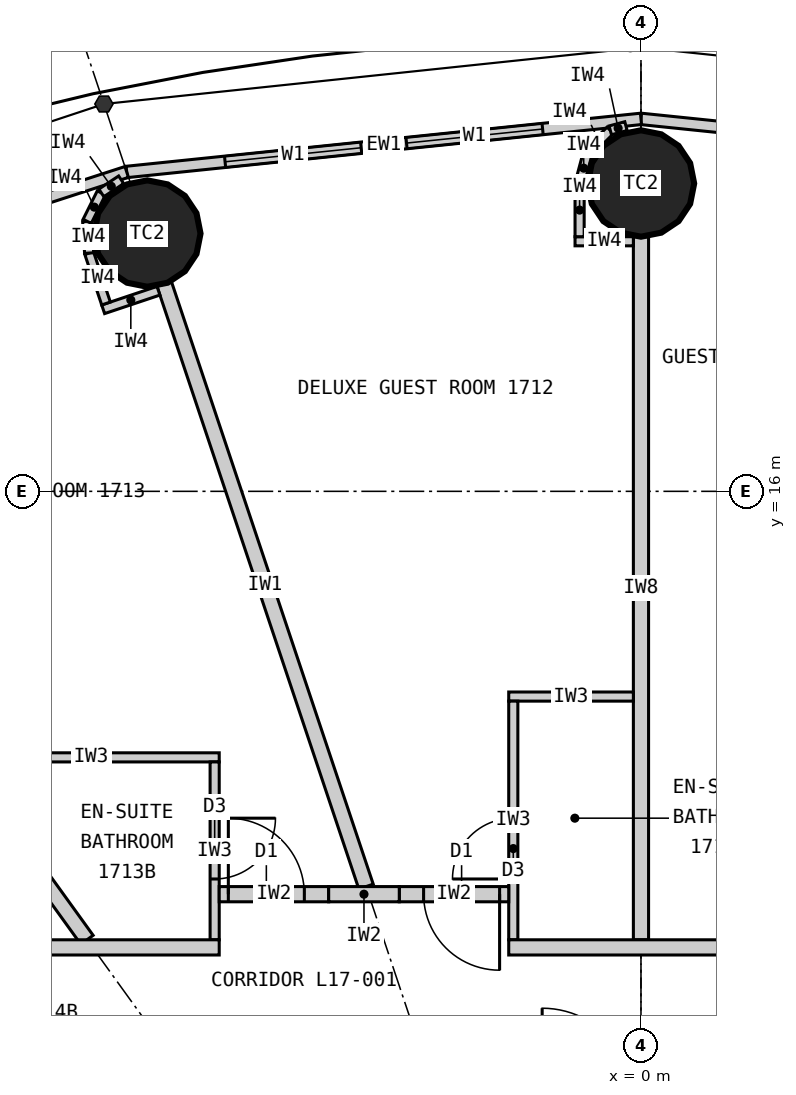
"""IFC4 building model, lengths in metres.
Left out: names, types, materials, properties, quantities, classifications, styles, units other than length and angle.
Written with IfcOpenShell. Run it as: python <this file> out.ifc"""

import sys

from ifc_helpers import new_model, si_unit, direction, frame, frame_2d, origin, origin_2d, place, context, subcontext, project, spatial, rectangle, circle, extrude, element, fill, save


model = new_model("IFC4")
c1 = context("Model", 3, precision=1e-05, world=origin(), true_north=direction((0.0, 1.0)))
c2 = subcontext(c1, "Body", "Model", "MODEL_VIEW")
j1 = project(units=[si_unit("LENGTHUNIT", "METRE"), si_unit("PLANEANGLEUNIT", "RADIAN")], contexts=[c1])
p1 = place(None, origin())
s1 = spatial("IfcSite", under=j1, at=p1, CompositionType="ELEMENT")
p2 = place(p1, origin())
s2 = spatial("IfcBuilding", under=s1, at=p2, CompositionType="ELEMENT")
p3 = place(p2, frame((0.0, 0.0, 70.5)))
s3 = spatial("IfcBuildingStorey", under=s2, at=p3, CompositionType="ELEMENT", Elevation=70.5)
for number, where, z_axis, x_axis in (
    (1, (0.0, 20.05, 0.0), (0.0, 0.0, 1.0), (1.0, 0.0, 0.0)),
    (2, (-6.495, 19.391, 0.0), (0.0, 0.0, 1.0), (1.0, 0.0, 0.0)),
):
    element("IfcColumn", number, at=place(p3, frame(where, z_axis=z_axis, x_axis=x_axis)), inside=s3, PredefinedType="COLUMN", context=c2, shape_type="SweptSolid", body=[
        extrude(circle(Radius=0.7, at=origin_2d()), origin(), (0.0, 0.0, 1.0), 3.3),
    ])
p4 = place(p3, frame((6.766, 20.202, 0.0), z_axis=(0.0, 0.0, 1.0), x_axis=(-0.994721394369, 0.102612609291, 0.0)))
e3 = element("IfcWall", 3, at=p4, inside=s3, PredefinedType="ELEMENTEDWALL", context=c2, shape_type="SweptSolid", body=[
    extrude(rectangle(XDim=6.802, YDim=0.15, at=frame_2d((3.401, 0.0))), origin(), (0.0, 0.0, 1.0), 3.12),
])
p5 = place(p4, frame((1.301, 0.0, 0.9)))
e4 = element("IfcOpeningElement", 4, at=p5, cuts=e3, PredefinedType="OPENING", context=c2, shape_type="SweptSolid", body=[
    extrude(rectangle(XDim=1.8, YDim=1.9, at=frame_2d((0.9, 0.95))), frame((0.0, 0.085, 0.0), z_axis=(0.0, -1.0, 0.0), x_axis=(1.0, 0.0, 0.0)), (0.0, 0.0, 1.0), 0.17),
])
p6 = place(p4, frame((3.701, 0.0, 0.9)))
e5 = element("IfcOpeningElement", 5, at=p6, cuts=e3, PredefinedType="OPENING", context=c2, shape_type="SweptSolid", body=[
    extrude(rectangle(XDim=1.8, YDim=1.9, at=frame_2d((0.9, 0.95))), frame((0.0, 0.085, 0.0), z_axis=(0.0, -1.0, 0.0), x_axis=(1.0, 0.0, 0.0)), (0.0, 0.0, 1.0), 0.17),
])
p7 = place(p3, frame((0.0, 20.9, 0.0), z_axis=(0.0, 0.0, 1.0), x_axis=(-0.994721394369, -0.102612609291, 0.0)))
e6 = element("IfcWall", 6, at=p7, inside=s3, PredefinedType="ELEMENTEDWALL", context=c2, shape_type="SweptSolid", body=[
    extrude(rectangle(XDim=6.802, YDim=0.15, at=frame_2d((3.401, 0.0))), origin(), (0.0, 0.0, 1.0), 3.12),
])
p8 = place(p7, frame((1.301, 0.0, 0.9)))
e7 = element("IfcOpeningElement", 7, at=p8, cuts=e6, PredefinedType="OPENING", context=c2, shape_type="SweptSolid", body=[
    extrude(rectangle(XDim=1.8, YDim=1.9, at=frame_2d((0.9, 0.95))), frame((0.0, 0.085, 0.0), z_axis=(0.0, -1.0, 0.0), x_axis=(1.0, 0.0, 0.0)), (0.0, 0.0, 1.0), 0.17),
])
p9 = place(p7, frame((3.701, 0.0, 0.9)))
e8 = element("IfcOpeningElement", 8, at=p9, cuts=e6, PredefinedType="OPENING", context=c2, shape_type="SweptSolid", body=[
    extrude(rectangle(XDim=1.8, YDim=1.9, at=frame_2d((0.9, 0.95))), frame((0.0, 0.085, 0.0), z_axis=(0.0, -1.0, 0.0), x_axis=(1.0, 0.0, 0.0)), (0.0, 0.0, 1.0), 0.17),
])
p10 = place(p3, frame((-6.766, 20.202, 0.0), z_axis=(0.0, 0.0, 1.0), x_axis=(-0.951137534625, -0.308767534285, 0.0)))
e9 = element("IfcWall", 9, at=p10, inside=s3, PredefinedType="ELEMENTEDWALL", context=c2, shape_type="SweptSolid", body=[
    extrude(rectangle(XDim=6.655, YDim=0.15, at=frame_2d((3.328, 0.0))), origin(), (0.0, 0.0, 1.0), 3.12),
])
p11 = place(p10, frame((1.228, 0.0, 0.9)))
e10 = element("IfcOpeningElement", 10, at=p11, cuts=e9, PredefinedType="OPENING", context=c2, shape_type="SweptSolid", body=[
    extrude(rectangle(XDim=1.8, YDim=1.9, at=frame_2d((0.9, 0.95))), frame((0.0, 0.085, 0.0), z_axis=(0.0, -1.0, 0.0), x_axis=(1.0, 0.0, 0.0)), (0.0, 0.0, 1.0), 0.17),
])
p12 = place(p10, frame((3.628, 0.0, 0.9)))
e11 = element("IfcOpeningElement", 11, at=p12, cuts=e9, PredefinedType="OPENING", context=c2, shape_type="SweptSolid", body=[
    extrude(rectangle(XDim=1.8, YDim=1.9, at=frame_2d((0.9, 0.95))), frame((0.0, 0.085, 0.0), z_axis=(0.0, -1.0, 0.0), x_axis=(1.0, 0.0, 0.0)), (0.0, 0.0, 1.0), 0.17),
])
p13 = place(p3, frame((0.0, 10.1, 0.0), z_axis=(0.0, 0.0, 1.0), x_axis=(0.0, 1.0, 0.0)))
e12 = element("IfcWall", 12, at=p13, inside=s3, PredefinedType="PARTITIONING", context=c2, shape_type="SweptSolid", body=[
    extrude(rectangle(XDim=9.25, YDim=0.2, at=frame_2d((4.625, 0.0))), origin(), (0.0, 0.0, 1.0), 2.32),
])
p14 = place(p3, frame((-3.617, 10.8, 0.0), z_axis=(0.0, 0.0, 1.0), x_axis=(-0.317576599239, 0.948232621046, 0.0)))
e13 = element("IfcWall", 13, at=p14, inside=s3, PredefinedType="PARTITIONING", context=c2, shape_type="SweptSolid", body=[
    extrude(rectangle(XDim=8.36, YDim=0.2, at=frame_2d((4.18, 0.0))), origin(), (0.0, 0.0, 1.0), 2.32),
])
p15 = place(p3, frame((-7.289, 10.1, 0.0), z_axis=(0.0, 0.0, 1.0), x_axis=(-0.585198353053, 0.810890182197, 0.0)))
e14 = element("IfcWall", 14, at=p15, inside=s3, PredefinedType="PARTITIONING", context=c2, shape_type="SweptSolid", body=[
    extrude(rectangle(XDim=8.36, YDim=0.2, at=frame_2d((4.18, 0.0))), origin(), (0.0, 0.0, 1.0), 2.32),
])
p16 = place(p3, frame((-0.1, 13.3, 0.0), z_axis=(0.0, 0.0, 1.0), x_axis=(-1.0, 0.0, 0.0)))
e15 = element("IfcWall", 15, at=p16, inside=s3, PredefinedType="PARTITIONING", context=c2, shape_type="SweptSolid", body=[
    extrude(rectangle(XDim=1.64, YDim=0.12, at=frame_2d((0.82, 0.0))), origin(), (0.0, 0.0, 1.0), 3.12),
])
p17 = place(p3, frame((-1.68, 10.1, 0.0), z_axis=(0.0, 0.0, 1.0), x_axis=(0.0, 1.0, 0.0)))
e16 = element("IfcWall", 16, at=p17, inside=s3, PredefinedType="PARTITIONING", context=c2, shape_type="SweptSolid", body=[
    extrude(rectangle(XDim=3.14, YDim=0.12, at=frame_2d((1.57, 0.0))), origin(), (0.0, 0.0, 1.0), 3.12),
])
p18 = place(p17, frame((0.8, 0.0, 0.0)))
e17 = element("IfcOpeningElement", 17, at=p18, cuts=e16, PredefinedType="OPENING", context=c2, shape_type="SweptSolid", body=[
    extrude(rectangle(XDim=0.8, YDim=2.1, at=frame_2d((0.4, 1.05))), frame((0.0, 0.07, 0.0), z_axis=(0.0, -1.0, 0.0), x_axis=(1.0, 0.0, 0.0)), (0.0, 0.0, 1.0), 0.14),
])
p19 = place(p3, frame((-8.921, 12.5, 0.0), z_axis=(0.0, 0.0, 1.0), x_axis=(1.0, 0.0, 0.0)))
e18 = element("IfcWall", 18, at=p19, inside=s3, PredefinedType="PARTITIONING", context=c2, shape_type="SweptSolid", body=[
    extrude(rectangle(XDim=3.372, YDim=0.12, at=frame_2d((1.686, 0.0))), origin(), (0.0, 0.0, 1.0), 3.12),
])
p20 = place(p3, frame((-5.609, 10.1, 0.0), z_axis=(0.0, 0.0, 1.0), x_axis=(0.0, 1.0, 0.0)))
e19 = element("IfcWall", 19, at=p20, inside=s3, PredefinedType="PARTITIONING", context=c2, shape_type="SweptSolid", body=[
    extrude(rectangle(XDim=2.34, YDim=0.12, at=frame_2d((1.17, 0.0))), origin(), (0.0, 0.0, 1.0), 3.12),
])
p21 = place(p20, frame((0.8, 0.0, 0.0)))
e20 = element("IfcOpeningElement", 20, at=p21, cuts=e19, PredefinedType="OPENING", context=c2, shape_type="SweptSolid", body=[
    extrude(rectangle(XDim=0.8, YDim=2.1, at=frame_2d((0.4, 1.05))), frame((0.0, 0.07, 0.0), z_axis=(0.0, -1.0, 0.0), x_axis=(1.0, 0.0, 0.0)), (0.0, 0.0, 1.0), 0.14),
])
p22 = place(p3, frame((-3.18, 10.7, 0.0), z_axis=(0.0, 0.0, 1.0), x_axis=(1.0, 0.0, 0.0)))
e21 = element("IfcWall", 21, at=p22, inside=s3, PredefinedType="PARTITIONING", context=c2, shape_type="SweptSolid", body=[
    extrude(rectangle(XDim=1.44, YDim=0.2, at=frame_2d((0.72, 0.0))), origin(), (0.0, 0.0, 1.0), 3.12),
])
p23 = place(p22, frame((0.32, 0.0, 0.0)))
e22 = element("IfcOpeningElement", 22, at=p23, cuts=e21, PredefinedType="OPENING", context=c2, shape_type="SweptSolid", body=[
    extrude(rectangle(XDim=1.0, YDim=2.2, at=frame_2d((0.5, 1.1))), frame((0.0, 0.11, 0.0), z_axis=(0.0, -1.0, 0.0), x_axis=(1.0, 0.0, 0.0)), (0.0, 0.0, 1.0), 0.22),
])
p24 = place(p3, frame((-5.549, 10.7, 0.0), z_axis=(0.0, 0.0, 1.0), x_axis=(1.0, 0.0, 0.0)))
e23 = element("IfcWall", 23, at=p24, inside=s3, PredefinedType="PARTITIONING", context=c2, shape_type="SweptSolid", body=[
    extrude(rectangle(XDim=1.44, YDim=0.2, at=frame_2d((0.72, 0.0))), origin(), (0.0, 0.0, 1.0), 3.12),
])
p25 = place(p24, frame((0.12, 0.0, 0.0)))
e24 = element("IfcOpeningElement", 24, at=p25, cuts=e23, PredefinedType="OPENING", context=c2, shape_type="SweptSolid", body=[
    extrude(rectangle(XDim=1.0, YDim=2.2, at=frame_2d((0.5, 1.1))), frame((0.0, 0.11, 0.0), z_axis=(0.0, -1.0, 0.0), x_axis=(1.0, 0.0, 0.0)), (0.0, 0.0, 1.0), 0.22),
])
p26 = place(p3, frame((-4.109, 10.7, 0.0), z_axis=(0.0, 0.0, 1.0), x_axis=(1.0, 0.0, 0.0)))
e25 = element("IfcWall", 25, at=p26, inside=s3, PredefinedType="PARTITIONING", context=c2, shape_type="SweptSolid", body=[
    extrude(rectangle(XDim=0.929, YDim=0.2, at=frame_2d((0.465, 0.0))), origin(), (0.0, 0.0, 1.0), 3.12),
])
p27 = place(p3, frame((-10.179, 10.0, 0.0), z_axis=(0.0, 0.0, 1.0), x_axis=(1.0, 0.0, 0.0)))
e26 = element("IfcWall", 26, at=p27, inside=s3, PredefinedType="PARTITIONING", context=c2, shape_type="SweptSolid", body=[
    extrude(rectangle(XDim=4.63, YDim=0.2, at=frame_2d((2.315, 0.0))), origin(), (0.0, 0.0, 1.0), 3.12),
])
p28 = place(p3, frame((-1.74, 10.0, 0.0), z_axis=(0.0, 0.0, 1.0), x_axis=(1.0, 0.0, 0.0)))
e27 = element("IfcWall", 27, at=p28, inside=s3, PredefinedType="PARTITIONING", context=c2, shape_type="SweptSolid", body=[
    extrude(rectangle(XDim=11.185, YDim=0.2, at=frame_2d((5.593, 0.0))), origin(), (0.0, 0.0, 1.0), 3.12),
])
p29 = place(p28, frame((7.609, 0.0, 0.0)))
e28 = element("IfcOpeningElement", 28, at=p29, cuts=e27, PredefinedType="OPENING", context=c2, shape_type="SweptSolid", body=[
    extrude(rectangle(XDim=1.0, YDim=2.2, at=frame_2d((0.5, 1.1))), frame((0.0, 0.11, 0.0), z_axis=(0.0, -1.0, 0.0), x_axis=(1.0, 0.0, 0.0)), (0.0, 0.0, 1.0), 0.22),
])
p30 = place(p28, frame((3.703, 0.0, 0.0)))
e29 = element("IfcOpeningElement", 29, at=p30, cuts=e27, PredefinedType="OPENING", context=c2, shape_type="SweptSolid", body=[
    extrude(rectangle(XDim=1.0, YDim=2.2, at=frame_2d((0.5, 1.1))), frame((0.0, 0.11, 0.0), z_axis=(0.0, -1.0, 0.0), x_axis=(1.0, 0.0, 0.0)), (0.0, 0.0, 1.0), 0.22),
])
p31 = place(p3, frame((-0.1, 19.29, 0.0), z_axis=(0.0, 0.0, 1.0), x_axis=(-1.0, 0.0, 0.0)))
e30 = element("IfcWall", 30, at=p31, inside=s3, PredefinedType="PARTITIONING", context=c2, shape_type="SweptSolid", body=[
    extrude(rectangle(XDim=0.767, YDim=0.12, at=frame_2d((0.384, 0.0))), origin(), (0.0, 0.0, 1.0), 3.12),
])
p32 = place(p3, frame((-0.808, 19.35, 0.0), z_axis=(0.0, 0.0, 1.0), x_axis=(0.0, 1.0, 0.0)))
e31 = element("IfcWall", 31, at=p32, inside=s3, PredefinedType="PARTITIONING", context=c2, shape_type="SweptSolid", body=[
    extrude(rectangle(XDim=0.7, YDim=0.12, at=frame_2d((0.35, 0.0))), origin(), (0.0, 0.0, 1.0), 3.12),
])
p33 = place(p3, frame((-0.808, 20.05, 0.0), z_axis=(0.0, 0.0, 1.0), x_axis=(0.2592614205, 0.965807183573, 0.0)))
e32 = element("IfcWall", 32, at=p33, inside=s3, PredefinedType="PARTITIONING", context=c2, shape_type="SweptSolid", body=[
    extrude(rectangle(XDim=0.418, YDim=0.12, at=frame_2d((0.209, 0.0))), origin(), (0.0, 0.0, 1.0), 3.12),
])
p34 = place(p3, frame((-0.699, 20.454, 0.0), z_axis=(0.0, 0.0, 1.0), x_axis=(0.707106781187, 0.707106781187, 0.0)))
e33 = element("IfcWall", 33, at=p34, inside=s3, PredefinedType="PARTITIONING", context=c2, shape_type="SweptSolid", body=[
    extrude(rectangle(XDim=0.418, YDim=0.12, at=frame_2d((0.209, 0.0))), origin(), (0.0, 0.0, 1.0), 3.12),
])
p35 = place(p3, frame((-0.404, 20.749, 0.0), z_axis=(0.0, 0.0, 1.0), x_axis=(0.965759066438, 0.25944060128, 0.0)))
e34 = element("IfcWall", 34, at=p35, inside=s3, PredefinedType="PARTITIONING", context=c2, shape_type="SweptSolid", body=[
    extrude(rectangle(XDim=0.214, YDim=0.12, at=frame_2d((0.107, 0.0))), origin(), (0.0, 0.0, 1.0), 3.12),
])
p36 = place(p3, frame((-6.348, 18.639, 0.0), z_axis=(0.0, 0.0, 1.0), x_axis=(-0.948268951266, -0.317468102437, 0.0)))
e35 = element("IfcWall", 35, at=p36, inside=s3, PredefinedType="PARTITIONING", context=c2, shape_type="SweptSolid", body=[
    extrude(rectangle(XDim=0.768, YDim=0.12, at=frame_2d((0.384, 0.0))), origin(), (0.0, 0.0, 1.0), 3.12),
])
p37 = place(p3, frame((-7.038, 18.471, 0.0), z_axis=(0.0, 0.0, 1.0), x_axis=(-0.317378466199, 0.9482989556, 0.0)))
e36 = element("IfcWall", 36, at=p37, inside=s3, PredefinedType="PARTITIONING", context=c2, shape_type="SweptSolid", body=[
    extrude(rectangle(XDim=0.7, YDim=0.12, at=frame_2d((0.35, 0.0))), origin(), (0.0, 0.0, 1.0), 3.12),
])
p38 = place(p3, frame((-7.26, 19.135, 0.0), z_axis=(0.0, 0.0, 1.0), x_axis=(-0.0613238046, 0.99811792439, 0.0)))
e37 = element("IfcWall", 37, at=p38, inside=s3, PredefinedType="PARTITIONING", context=c2, shape_type="SweptSolid", body=[
    extrude(rectangle(XDim=0.418, YDim=0.12, at=frame_2d((0.209, 0.0))), origin(), (0.0, 0.0, 1.0), 3.12),
])
p39 = place(p3, frame((-7.286, 19.552, 0.0), z_axis=(0.0, 0.0, 1.0), x_axis=(0.445810757773, 0.89512723579, 0.0)))
e38 = element("IfcWall", 38, at=p39, inside=s3, PredefinedType="PARTITIONING", context=c2, shape_type="SweptSolid", body=[
    extrude(rectangle(XDim=0.418, YDim=0.12, at=frame_2d((0.209, 0.0))), origin(), (0.0, 0.0, 1.0), 3.12),
])
p40 = place(p3, frame((-7.1, 19.926, 0.0), z_axis=(0.0, 0.0, 1.0), x_axis=(0.833488262509, 0.552537162787, 0.0)))
e39 = element("IfcWall", 39, at=p40, inside=s3, PredefinedType="PARTITIONING", context=c2, shape_type="SweptSolid", body=[
    extrude(rectangle(XDim=0.313, YDim=0.12, at=frame_2d((0.156, 0.0))), origin(), (0.0, 0.0, 1.0), 3.12),
])
p41 = place(p8, origin())
e40 = element("IfcWindow", 40, at=p41, inside=s3, PartitioningType="SINGLE_PANEL", PredefinedType="WINDOW", context=c2, shape_type="SweptSolid", body=[
    extrude(rectangle(XDim=1.8, YDim=1.9, at=frame_2d((0.9, 0.95))), frame((0.0, 0.03, 0.0), z_axis=(0.0, -1.0, 0.0), x_axis=(1.0, 0.0, 0.0)), (0.0, 0.0, 1.0), 0.06),
])
fill(e7, e40)
p42 = place(p9, origin())
e41 = element("IfcWindow", 41, at=p42, inside=s3, PartitioningType="SINGLE_PANEL", PredefinedType="WINDOW", context=c2, shape_type="SweptSolid", body=[
    extrude(rectangle(XDim=1.8, YDim=1.9, at=frame_2d((0.9, 0.95))), frame((0.0, 0.03, 0.0), z_axis=(0.0, -1.0, 0.0), x_axis=(1.0, 0.0, 0.0)), (0.0, 0.0, 1.0), 0.06),
])
fill(e8, e41)
p43 = place(p18, origin())
e42 = element("IfcDoor", 42, at=p43, inside=s3, OperationType="SINGLE_SWING_LEFT", PredefinedType="DOOR", context=c2, shape_type="SweptSolid", body=[
    extrude(rectangle(XDim=0.8, YDim=2.1, at=frame_2d((0.4, 1.05))), frame((0.0, 0.025, 0.0), z_axis=(0.0, -1.0, 0.0), x_axis=(1.0, 0.0, 0.0)), (0.0, 0.0, 1.0), 0.05),
])
fill(e17, e42)
p44 = place(p23, origin())
e43 = element("IfcDoor", 43, at=p44, inside=s3, OperationType="SINGLE_SWING_RIGHT", PredefinedType="DOOR", context=c2, shape_type="SweptSolid", body=[
    extrude(rectangle(XDim=1.0, YDim=2.2, at=frame_2d((0.5, 1.1))), frame((0.0, 0.025, 0.0), z_axis=(0.0, -1.0, 0.0), x_axis=(1.0, 0.0, 0.0)), (0.0, 0.0, 1.0), 0.05),
])
fill(e22, e43)
p45 = place(p21, origin())
e44 = element("IfcDoor", 44, at=p45, inside=s3, OperationType="SINGLE_SWING_RIGHT", PredefinedType="DOOR", context=c2, shape_type="SweptSolid", body=[
    extrude(rectangle(XDim=0.8, YDim=2.1, at=frame_2d((0.4, 1.05))), frame((0.0, 0.025, 0.0), z_axis=(0.0, -1.0, 0.0), x_axis=(1.0, 0.0, 0.0)), (0.0, 0.0, 1.0), 0.05),
])
fill(e20, e44)
p46 = place(p25, origin())
e45 = element("IfcDoor", 45, at=p46, inside=s3, OperationType="SINGLE_SWING_LEFT", PredefinedType="DOOR", context=c2, shape_type="SweptSolid", body=[
    extrude(rectangle(XDim=1.0, YDim=2.2, at=frame_2d((0.5, 1.1))), frame((0.0, 0.025, 0.0), z_axis=(0.0, -1.0, 0.0), x_axis=(1.0, 0.0, 0.0)), (0.0, 0.0, 1.0), 0.05),
])
fill(e24, e45)
save(model, sys.argv[1])
